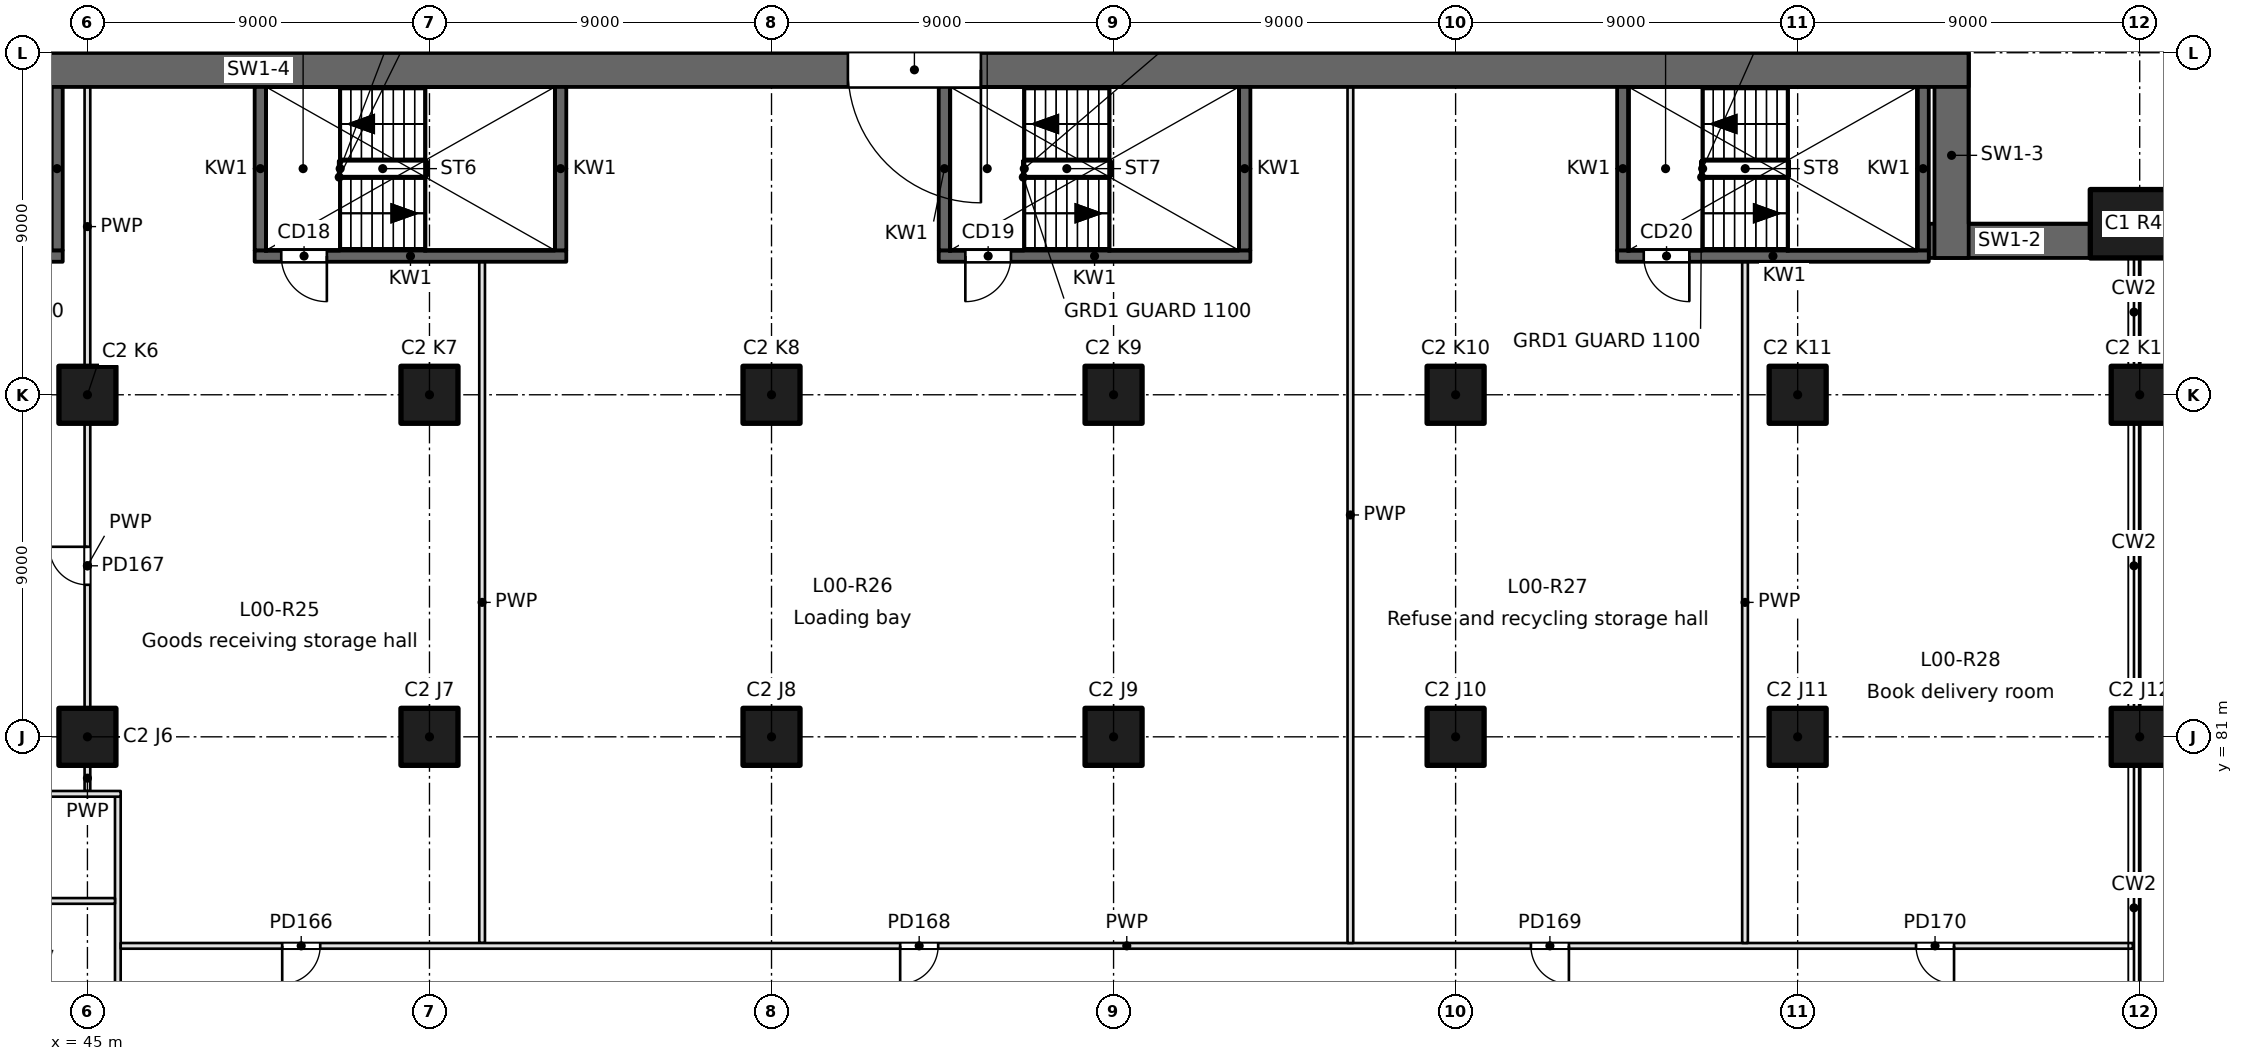
"""IFC4 building model, lengths in metres.
Left out: names, types, materials, properties, quantities, classifications, styles, units other than length and angle.
Written with IfcOpenShell. Run it as: python <this file> out.ifc"""

import sys

from ifc_helpers import new_model, si_unit, direction, frame, frame_2d, origin, origin_2d, place, context, subcontext, project, spatial, rectangle, extrude, element, fill, save


model = new_model("IFC4")
c1 = context("Model", 3, precision=1e-05, world=origin(), true_north=direction((0.0, 1.0)))
c2 = subcontext(c1, "Body", "Model", "MODEL_VIEW")
j1 = project(units=[si_unit("LENGTHUNIT", "METRE"), si_unit("PLANEANGLEUNIT", "RADIAN")], contexts=[c1])
p1 = place(None, origin())
s1 = spatial("IfcSite", under=j1, at=p1, CompositionType="ELEMENT")
p2 = place(p1, origin())
s2 = spatial("IfcBuilding", under=s1, at=p2, CompositionType="ELEMENT")
p3 = place(p2, origin())
s3 = spatial("IfcBuildingStorey", under=s2, at=p3, CompositionType="ELEMENT", Elevation=0.0)
for number, where, z_axis, x_axis in (
    (1, (99.0, 81.0, 0.0), (0.0, 0.0, 1.0), (1.0, 0.0, 0.0)),
    (2, (99.0, 90.0, 0.0), (0.0, 0.0, 1.0), (1.0, 0.0, 0.0)),
):
    element("IfcColumn", number, at=place(p3, frame(where, z_axis=z_axis, x_axis=x_axis)), inside=s3, PredefinedType="COLUMN", context=c2, shape_type="SweptSolid", body=[
        extrude(rectangle(XDim=1.5, YDim=1.5, at=origin_2d()), origin(), (0.0, 0.0, 1.0), 6.0),
    ])
p4 = place(p3, frame((99.0, 94.5, 0.0), z_axis=(0.0, 0.0, 1.0), x_axis=(1.0, 0.0, 0.0)))
e3 = element("IfcColumn", 3, at=p4, inside=s3, PredefinedType="COLUMN", context=c2, shape_type="SweptSolid", body=[
    extrude(rectangle(XDim=2.6, YDim=1.8, at=origin_2d()), origin(), (0.0, 0.0, 1.0), 6.0),
])
for number, where, z_axis, x_axis in (
    (4, (45.0, 81.0, 0.0), (0.0, 0.0, 1.0), (1.0, 0.0, 0.0)),
    (5, (45.0, 90.0, 0.0), (0.0, 0.0, 1.0), (1.0, 0.0, 0.0)),
    (6, (54.0, 81.0, 0.0), (0.0, 0.0, 1.0), (1.0, 0.0, 0.0)),
    (7, (54.0, 90.0, 0.0), (0.0, 0.0, 1.0), (1.0, 0.0, 0.0)),
    (8, (63.0, 81.0, 0.0), (0.0, 0.0, 1.0), (1.0, 0.0, 0.0)),
    (9, (63.0, 90.0, 0.0), (0.0, 0.0, 1.0), (1.0, 0.0, 0.0)),
    (10, (72.0, 81.0, 0.0), (0.0, 0.0, 1.0), (1.0, 0.0, 0.0)),
    (11, (72.0, 90.0, 0.0), (0.0, 0.0, 1.0), (1.0, 0.0, 0.0)),
    (12, (81.0, 81.0, 0.0), (0.0, 0.0, 1.0), (1.0, 0.0, 0.0)),
    (13, (81.0, 90.0, 0.0), (0.0, 0.0, 1.0), (1.0, 0.0, 0.0)),
    (14, (90.0, 81.0, 0.0), (0.0, 0.0, 1.0), (1.0, 0.0, 0.0)),
    (15, (90.0, 90.0, 0.0), (0.0, 0.0, 1.0), (1.0, 0.0, 0.0)),
):
    element("IfcColumn", number, at=place(p3, frame(where, z_axis=z_axis, x_axis=x_axis)), inside=s3, PredefinedType="COLUMN", context=c2, shape_type="SweptSolid", body=[
        extrude(rectangle(XDim=1.5, YDim=1.5, at=origin_2d()), origin(), (0.0, 0.0, 1.0), 6.0),
    ])
p5 = place(p3, frame((97.7, 94.05, 0.0), z_axis=(0.0, 0.0, 1.0), x_axis=(-1.0, 0.0, 0.0)))
e16 = element("IfcWall", 16, at=p5, inside=s3, PredefinedType="SHEAR", context=c2, shape_type="SweptSolid", body=[
    extrude(rectangle(XDim=4.25, YDim=0.9, at=frame_2d((2.125, 0.0))), origin(), (0.0, 0.0, 1.0), 6.0),
])
p6 = place(p3, frame((94.05, 93.6, 0.0), z_axis=(0.0, 0.0, 1.0), x_axis=(0.0, 1.0, 0.0)))
e17 = element("IfcWall", 17, at=p6, inside=s3, PredefinedType="SHEAR", context=c2, shape_type="SweptSolid", body=[
    extrude(rectangle(XDim=5.4, YDim=0.9, at=frame_2d((2.7, 0.0))), origin(), (0.0, 0.0, 1.0), 6.0),
])
p7 = place(p3, frame((94.5, 98.55, 0.0), z_axis=(0.0, 0.0, 1.0), x_axis=(-1.0, 0.0, 0.0)))
e18 = element("IfcWall", 18, at=p7, inside=s3, PredefinedType="SHEAR", context=c2, shape_type="SweptSolid", body=[
    extrude(rectangle(XDim=90.0, YDim=0.9, at=frame_2d((45.0, 0.0))), origin(), (0.0, 0.0, 1.0), 6.0),
])
p8 = place(p7, frame((25.99, 0.0, 0.0)))
e19 = element("IfcOpeningElement", 19, at=p8, cuts=e18, PredefinedType="OPENING", context=c2, shape_type="SweptSolid", body=[
    extrude(rectangle(XDim=3.5, YDim=3.5, at=frame_2d((1.75, 1.75))), frame((0.0, 0.45, 0.0), z_axis=(0.0, -1.0, 0.0), x_axis=(1.0, 0.0, 0.0)), (0.0, 0.0, 1.0), 0.9),
])
p9 = place(p3, frame((36.15, 93.65, -0.4), z_axis=(0.0, 0.0, 1.0), x_axis=(1.0, 0.0, 0.0)))
e20 = element("IfcWall", 20, at=p9, inside=s3, PredefinedType="SOLIDWALL", context=c2, shape_type="SweptSolid", body=[
    extrude(rectangle(XDim=8.2, YDim=0.3, at=frame_2d((4.1, 0.0))), origin(), (0.0, 0.0, 1.0), 6.05),
])
p10 = place(p9, frame((0.7, 0.0, 0.4)))
e21 = element("IfcOpeningElement", 21, at=p10, cuts=e20, PredefinedType="OPENING", context=c2, shape_type="SweptSolid", body=[
    extrude(rectangle(XDim=1.2, YDim=2.1, at=frame_2d((0.6, 1.05))), frame((0.0, 0.15, 0.0), z_axis=(0.0, -1.0, 0.0), x_axis=(1.0, 0.0, 0.0)), (0.0, 0.0, 1.0), 0.3),
])
p11 = place(p3, frame((49.4, 93.65, -0.4), z_axis=(0.0, 0.0, 1.0), x_axis=(1.0, 0.0, 0.0)))
e22 = element("IfcWall", 22, at=p11, inside=s3, PredefinedType="SOLIDWALL", context=c2, shape_type="SweptSolid", body=[
    extrude(rectangle(XDim=8.2, YDim=0.3, at=frame_2d((4.1, 0.0))), origin(), (0.0, 0.0, 1.0), 6.05),
])
p12 = place(p11, frame((0.7, 0.0, 0.4)))
e23 = element("IfcOpeningElement", 23, at=p12, cuts=e22, PredefinedType="OPENING", context=c2, shape_type="SweptSolid", body=[
    extrude(rectangle(XDim=1.2, YDim=2.1, at=frame_2d((0.6, 1.05))), frame((0.0, 0.15, 0.0), z_axis=(0.0, -1.0, 0.0), x_axis=(1.0, 0.0, 0.0)), (0.0, 0.0, 1.0), 0.3),
])
p13 = place(p3, frame((67.4, 93.65, -0.4), z_axis=(0.0, 0.0, 1.0), x_axis=(1.0, 0.0, 0.0)))
e24 = element("IfcWall", 24, at=p13, inside=s3, PredefinedType="SOLIDWALL", context=c2, shape_type="SweptSolid", body=[
    extrude(rectangle(XDim=8.2, YDim=0.3, at=frame_2d((4.1, 0.0))), origin(), (0.0, 0.0, 1.0), 6.05),
])
p14 = place(p13, frame((0.7, 0.0, 0.4)))
e25 = element("IfcOpeningElement", 25, at=p14, cuts=e24, PredefinedType="OPENING", context=c2, shape_type="SweptSolid", body=[
    extrude(rectangle(XDim=1.2, YDim=2.1, at=frame_2d((0.6, 1.05))), frame((0.0, 0.15, 0.0), z_axis=(0.0, -1.0, 0.0), x_axis=(1.0, 0.0, 0.0)), (0.0, 0.0, 1.0), 0.3),
])
p15 = place(p3, frame((85.25, 93.65, -0.4), z_axis=(0.0, 0.0, 1.0), x_axis=(1.0, 0.0, 0.0)))
e26 = element("IfcWall", 26, at=p15, inside=s3, PredefinedType="SOLIDWALL", context=c2, shape_type="SweptSolid", body=[
    extrude(rectangle(XDim=8.2, YDim=0.3, at=frame_2d((4.1, 0.0))), origin(), (0.0, 0.0, 1.0), 6.05),
])
p16 = place(p15, frame((0.7, 0.0, 0.4)))
e27 = element("IfcOpeningElement", 27, at=p16, cuts=e26, PredefinedType="OPENING", context=c2, shape_type="SweptSolid", body=[
    extrude(rectangle(XDim=1.2, YDim=2.1, at=frame_2d((0.6, 1.05))), frame((0.0, 0.15, 0.0), z_axis=(0.0, -1.0, 0.0), x_axis=(1.0, 0.0, 0.0)), (0.0, 0.0, 1.0), 0.3),
])
for number, where, z_axis, x_axis in (
    (28, (44.2, 93.8, -0.4), (0.0, 0.0, 1.0), (0.0, 1.0, 0.0)),
    (29, (49.55, 93.8, -0.4), (0.0, 0.0, 1.0), (0.0, 1.0, 0.0)),
    (30, (57.45, 93.8, -0.4), (0.0, 0.0, 1.0), (0.0, 1.0, 0.0)),
    (31, (67.55, 93.8, -0.4), (0.0, 0.0, 1.0), (0.0, 1.0, 0.0)),
    (32, (75.45, 93.8, -0.4), (0.0, 0.0, 1.0), (0.0, 1.0, 0.0)),
    (33, (85.4, 93.8, -0.4), (0.0, 0.0, 1.0), (0.0, 1.0, 0.0)),
    (34, (93.3, 93.8, -0.4), (0.0, 0.0, 1.0), (0.0, 1.0, 0.0)),
):
    element("IfcWall", number, at=place(p3, frame(where, z_axis=z_axis, x_axis=x_axis)), inside=s3, PredefinedType="SOLIDWALL", context=c2, shape_type="SweptSolid", body=[
        extrude(rectangle(XDim=4.3, YDim=0.3, at=frame_2d((2.15, 0.0))), origin(), (0.0, 0.0, 1.0), 6.05),
    ])
p17 = place(p3, frame((45.0, 79.575, 0.0), z_axis=(0.0, 0.0, 1.0), x_axis=(0.0, 1.0, 0.0)))
e35 = element("IfcWall", 35, at=p17, inside=s3, PredefinedType="PARTITIONING", context=c2, shape_type="SweptSolid", body=[
    extrude(rectangle(XDim=0.675, YDim=0.15, at=frame_2d((0.337, 0.0))), origin(), (0.0, 0.0, 1.0), 5.65),
])
p18 = place(p3, frame((45.0, 81.75, 0.0), z_axis=(0.0, 0.0, 1.0), x_axis=(0.0, 1.0, 0.0)))
e36 = element("IfcWall", 36, at=p18, inside=s3, PredefinedType="PARTITIONING", context=c2, shape_type="SweptSolid", body=[
    extrude(rectangle(XDim=7.5, YDim=0.15, at=frame_2d((3.75, 0.0))), origin(), (0.0, 0.0, 1.0), 5.65),
])
p19 = place(p18, frame((3.25, 0.0, 0.0)))
e37 = element("IfcOpeningElement", 37, at=p19, cuts=e36, PredefinedType="OPENING", context=c2, shape_type="SweptSolid", body=[
    extrude(rectangle(XDim=1.0, YDim=2.1, at=frame_2d((0.5, 1.05))), frame((0.0, 0.075, 0.0), z_axis=(0.0, -1.0, 0.0), x_axis=(1.0, 0.0, 0.0)), (0.0, 0.0, 1.0), 0.15),
])
p20 = place(p3, frame((45.0, 90.75, 0.0), z_axis=(0.0, 0.0, 1.0), x_axis=(0.0, 1.0, 0.0)))
e38 = element("IfcWall", 38, at=p20, inside=s3, PredefinedType="PARTITIONING", context=c2, shape_type="SweptSolid", body=[
    extrude(rectangle(XDim=7.35, YDim=0.15, at=frame_2d((3.675, 0.0))), origin(), (0.0, 0.0, 1.0), 5.65),
])
p21 = place(p3, frame((45.8, 79.425, 0.0), z_axis=(0.0, 0.0, 1.0), x_axis=(0.0, -1.0, 0.0)))
e39 = element("IfcWall", 39, at=p21, inside=s3, PredefinedType="PARTITIONING", context=c2, shape_type="SweptSolid", body=[
    extrude(rectangle(XDim=15.35, YDim=0.15, at=frame_2d((7.675, 0.0))), origin(), (0.0, 0.0, 1.0), 5.65),
])
p22 = place(p3, frame((40.575, 76.682, 0.0), z_axis=(0.0, 0.0, 1.0), x_axis=(1.0, 0.0, 0.0)))
e40 = element("IfcWall", 40, at=p22, inside=s3, PredefinedType="PARTITIONING", context=c2, shape_type="SweptSolid", body=[
    extrude(rectangle(XDim=5.15, YDim=0.15, at=frame_2d((2.575, 0.0))), origin(), (0.0, 0.0, 1.0), 5.65),
])
p23 = place(p3, frame((40.425, 79.5, 0.0), z_axis=(0.0, 0.0, 1.0), x_axis=(1.0, 0.0, 0.0)))
e41 = element("IfcWall", 41, at=p23, inside=s3, PredefinedType="PARTITIONING", context=c2, shape_type="SweptSolid", body=[
    extrude(rectangle(XDim=5.45, YDim=0.15, at=frame_2d((2.725, 0.0))), origin(), (0.0, 0.0, 1.0), 5.65),
])
p24 = place(p23, frame((1.825, 0.0, 0.0)))
e42 = element("IfcOpeningElement", 42, at=p24, cuts=e41, PredefinedType="OPENING", context=c2, shape_type="SweptSolid", body=[
    extrude(rectangle(XDim=1.0, YDim=2.1, at=frame_2d((0.5, 1.05))), frame((0.0, 0.075, 0.0), z_axis=(0.0, -1.0, 0.0), x_axis=(1.0, 0.0, 0.0)), (0.0, 0.0, 1.0), 0.15),
])
p25 = place(p3, frame((55.385, 75.575, 0.0), z_axis=(0.0, 0.0, 1.0), x_axis=(0.0, 1.0, 0.0)))
e43 = element("IfcWall", 43, at=p25, inside=s3, PredefinedType="PARTITIONING", context=c2, shape_type="SweptSolid", body=[
    extrude(rectangle(XDim=17.925, YDim=0.15, at=frame_2d((8.962, 0.0))), origin(), (0.0, 0.0, 1.0), 5.65),
])
p26 = place(p3, frame((98.82, 75.5, 0.0), z_axis=(0.0, 0.0, 1.0), x_axis=(-1.0, 0.0, 0.0)))
e44 = element("IfcWall", 44, at=p26, inside=s3, PredefinedType="PARTITIONING", context=c2, shape_type="SweptSolid", body=[
    extrude(rectangle(XDim=52.945, YDim=0.15, at=frame_2d((26.473, 0.0))), origin(), (0.0, 0.0, 1.0), 5.65),
])
p27 = place(p26, frame((47.695, 0.0, 0.0)))
e45 = element("IfcOpeningElement", 45, at=p27, cuts=e44, PredefinedType="OPENING", context=c2, shape_type="SweptSolid", body=[
    extrude(rectangle(XDim=1.0, YDim=2.1, at=frame_2d((0.5, 1.05))), frame((0.0, 0.075, 0.0), z_axis=(0.0, -1.0, 0.0), x_axis=(1.0, 0.0, 0.0)), (0.0, 0.0, 1.0), 0.15),
])
p28 = place(p26, frame((31.435, 0.0, 0.0)))
e46 = element("IfcOpeningElement", 46, at=p28, cuts=e44, PredefinedType="OPENING", context=c2, shape_type="SweptSolid", body=[
    extrude(rectangle(XDim=1.0, YDim=2.1, at=frame_2d((0.5, 1.05))), frame((0.0, 0.075, 0.0), z_axis=(0.0, -1.0, 0.0), x_axis=(1.0, 0.0, 0.0)), (0.0, 0.0, 1.0), 0.15),
])
p29 = place(p26, frame((14.839, 0.0, 0.0)))
e47 = element("IfcOpeningElement", 47, at=p29, cuts=e44, PredefinedType="OPENING", context=c2, shape_type="SweptSolid", body=[
    extrude(rectangle(XDim=1.0, YDim=2.1, at=frame_2d((0.5, 1.05))), frame((0.0, 0.075, 0.0), z_axis=(0.0, -1.0, 0.0), x_axis=(1.0, 0.0, 0.0)), (0.0, 0.0, 1.0), 0.15),
])
p30 = place(p26, frame((4.705, 0.0, 0.0)))
e48 = element("IfcOpeningElement", 48, at=p30, cuts=e44, PredefinedType="OPENING", context=c2, shape_type="SweptSolid", body=[
    extrude(rectangle(XDim=1.0, YDim=2.1, at=frame_2d((0.5, 1.05))), frame((0.0, 0.075, 0.0), z_axis=(0.0, -1.0, 0.0), x_axis=(1.0, 0.0, 0.0)), (0.0, 0.0, 1.0), 0.15),
])
p31 = place(p3, frame((78.231, 75.575, 0.0), z_axis=(0.0, 0.0, 1.0), x_axis=(0.0, 1.0, 0.0)))
e49 = element("IfcWall", 49, at=p31, inside=s3, PredefinedType="PARTITIONING", context=c2, shape_type="SweptSolid", body=[
    extrude(rectangle(XDim=22.525, YDim=0.15, at=frame_2d((11.263, 0.0))), origin(), (0.0, 0.0, 1.0), 5.65),
])
p32 = place(p3, frame((88.615, 75.575, 0.0), z_axis=(0.0, 0.0, 1.0), x_axis=(0.0, 1.0, 0.0)))
e50 = element("IfcWall", 50, at=p32, inside=s3, PredefinedType="PARTITIONING", context=c2, shape_type="SweptSolid", body=[
    extrude(rectangle(XDim=17.925, YDim=0.15, at=frame_2d((8.962, 0.0))), origin(), (0.0, 0.0, 1.0), 5.65),
])
p33 = place(p12, frame((1.2, 0.0, 0.0), z_axis=(0.0, 0.0, 1.0), x_axis=(-1.0, 0.0, 0.0)))
e51 = element("IfcDoor", 51, at=p33, inside=s3, OperationType="SINGLE_SWING_LEFT", PredefinedType="DOOR", context=c2, shape_type="SweptSolid", body=[
    extrude(rectangle(XDim=1.2, YDim=2.1, at=frame_2d((0.6, 1.05))), frame((0.0, 0.025, 0.0), z_axis=(0.0, -1.0, 0.0), x_axis=(1.0, 0.0, 0.0)), (0.0, 0.0, 1.0), 0.05),
])
fill(e23, e51)
p34 = place(p14, frame((1.2, 0.0, 0.0), z_axis=(0.0, 0.0, 1.0), x_axis=(-1.0, 0.0, 0.0)))
e52 = element("IfcDoor", 52, at=p34, inside=s3, OperationType="SINGLE_SWING_RIGHT", PredefinedType="DOOR", context=c2, shape_type="SweptSolid", body=[
    extrude(rectangle(XDim=1.2, YDim=2.1, at=frame_2d((0.6, 1.05))), frame((0.0, 0.025, 0.0), z_axis=(0.0, -1.0, 0.0), x_axis=(1.0, 0.0, 0.0)), (0.0, 0.0, 1.0), 0.05),
])
fill(e25, e52)
p35 = place(p16, frame((1.2, 0.0, 0.0), z_axis=(0.0, 0.0, 1.0), x_axis=(-1.0, 0.0, 0.0)))
e53 = element("IfcDoor", 53, at=p35, inside=s3, OperationType="SINGLE_SWING_LEFT", PredefinedType="DOOR", context=c2, shape_type="SweptSolid", body=[
    extrude(rectangle(XDim=1.2, YDim=2.1, at=frame_2d((0.6, 1.05))), frame((0.0, 0.025, 0.0), z_axis=(0.0, -1.0, 0.0), x_axis=(1.0, 0.0, 0.0)), (0.0, 0.0, 1.0), 0.05),
])
fill(e27, e53)
p36 = place(p27, origin())
e54 = element("IfcDoor", 54, at=p36, inside=s3, OperationType="SINGLE_SWING_RIGHT", PredefinedType="DOOR", context=c2, shape_type="SweptSolid", body=[
    extrude(rectangle(XDim=1.0, YDim=2.1, at=frame_2d((0.5, 1.05))), frame((0.0, 0.025, 0.0), z_axis=(0.0, -1.0, 0.0), x_axis=(1.0, 0.0, 0.0)), (0.0, 0.0, 1.0), 0.05),
])
fill(e45, e54)
p37 = place(p19, origin())
e55 = element("IfcDoor", 55, at=p37, inside=s3, OperationType="SINGLE_SWING_RIGHT", PredefinedType="DOOR", context=c2, shape_type="SweptSolid", body=[
    extrude(rectangle(XDim=1.0, YDim=2.1, at=frame_2d((0.5, 1.05))), frame((0.0, 0.025, 0.0), z_axis=(0.0, -1.0, 0.0), x_axis=(1.0, 0.0, 0.0)), (0.0, 0.0, 1.0), 0.05),
])
fill(e37, e55)
p38 = place(p28, origin())
e56 = element("IfcDoor", 56, at=p38, inside=s3, OperationType="SINGLE_SWING_RIGHT", PredefinedType="DOOR", context=c2, shape_type="SweptSolid", body=[
    extrude(rectangle(XDim=1.0, YDim=2.1, at=frame_2d((0.5, 1.05))), frame((0.0, 0.025, 0.0), z_axis=(0.0, -1.0, 0.0), x_axis=(1.0, 0.0, 0.0)), (0.0, 0.0, 1.0), 0.05),
])
fill(e46, e56)
p39 = place(p29, origin())
e57 = element("IfcDoor", 57, at=p39, inside=s3, OperationType="SINGLE_SWING_LEFT", PredefinedType="DOOR", context=c2, shape_type="SweptSolid", body=[
    extrude(rectangle(XDim=1.0, YDim=2.1, at=frame_2d((0.5, 1.05))), frame((0.0, 0.025, 0.0), z_axis=(0.0, -1.0, 0.0), x_axis=(1.0, 0.0, 0.0)), (0.0, 0.0, 1.0), 0.05),
])
fill(e47, e57)
p40 = place(p30, origin())
e58 = element("IfcDoor", 58, at=p40, inside=s3, OperationType="SINGLE_SWING_LEFT", PredefinedType="DOOR", context=c2, shape_type="SweptSolid", body=[
    extrude(rectangle(XDim=1.0, YDim=2.1, at=frame_2d((0.5, 1.05))), frame((0.0, 0.025, 0.0), z_axis=(0.0, -1.0, 0.0), x_axis=(1.0, 0.0, 0.0)), (0.0, 0.0, 1.0), 0.05),
])
fill(e48, e58)
p41 = place(p8, origin())
e59 = element("IfcDoor", 59, at=p41, inside=s3, OperationType="ROLLINGUP", PredefinedType="DOOR", context=c2, shape_type="SweptSolid", body=[
    extrude(rectangle(XDim=3.5, YDim=3.5, at=frame_2d((1.75, 1.75))), frame((0.0, 0.025, 0.0), z_axis=(0.0, -1.0, 0.0), x_axis=(1.0, 0.0, 0.0)), (0.0, 0.0, 1.0), 0.05),
])
fill(e19, e59)
save(model, sys.argv[1])
